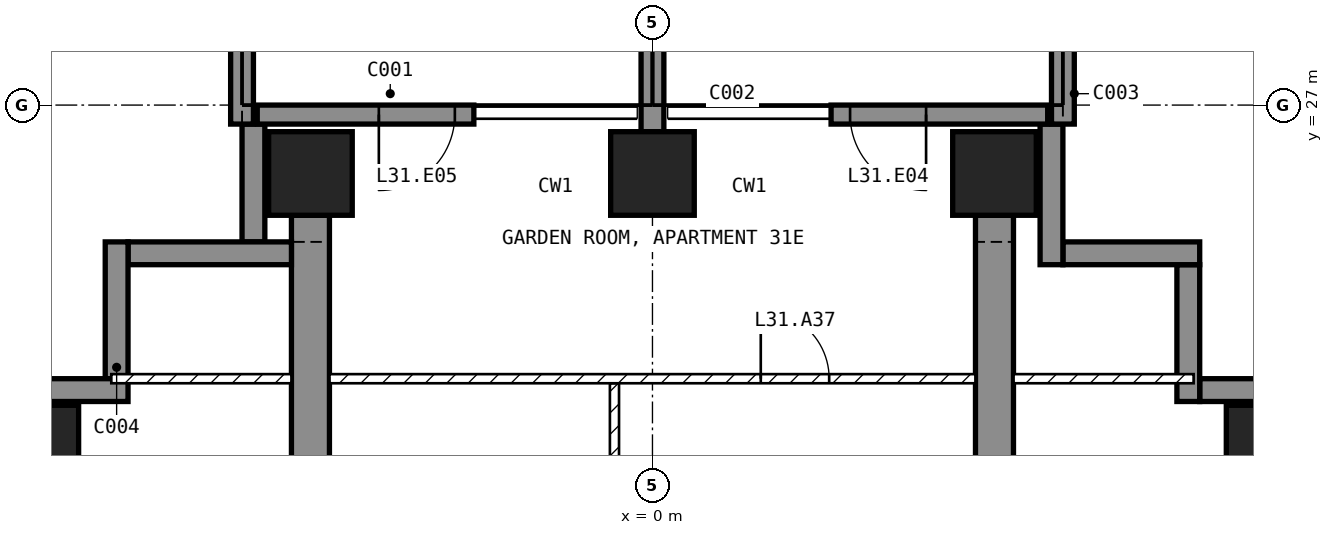
"""IFC4 building model, lengths in metres.
Left out: names, types, materials, properties, quantities, classifications, styles, units other than length and angle.
Written with IfcOpenShell. Run it as: python <this file> out.ifc"""

import sys

from ifc_helpers import new_model, si_unit, direction, frame, frame_2d, origin, origin_2d, place, context, subcontext, project, spatial, polyline, rectangle, outline, extrude, element, fill, save


model = new_model("IFC4")
c1 = context("Model", 3, precision=1e-05, world=origin(), true_north=direction((0.0, 1.0)))
c2 = subcontext(c1, "Body", "Model", "MODEL_VIEW")
j1 = project(units=[si_unit("LENGTHUNIT", "METRE"), si_unit("PLANEANGLEUNIT", "RADIAN")], contexts=[c1])
p1 = place(None, origin())
s1 = spatial("IfcSite", under=j1, at=p1, CompositionType="ELEMENT")
p2 = place(p1, origin())
s2 = spatial("IfcBuilding", under=s1, at=p2, CompositionType="ELEMENT")
p3 = place(p2, frame((0.0, 0.0, 130.4)))
s3 = spatial("IfcBuildingStorey", under=s2, at=p3, CompositionType="ELEMENT", Elevation=130.4)
for number, where, z_axis, x_axis in (
    (1, (-8.1, 22.5, -0.25), (0.0, 0.0, 1.0), (1.0, 0.0, 0.0)),
    (2, (-4.5, 26.1, -0.25), (0.0, 0.0, 1.0), (1.0, 0.0, 0.0)),
    (3, (0.0, 26.1, -0.25), (0.0, 0.0, 1.0), (1.0, 0.0, 0.0)),
    (4, (4.5, 26.1, -0.25), (0.0, 0.0, 1.0), (1.0, 0.0, 0.0)),
    (5, (8.1, 22.5, -0.25), (0.0, 0.0, 1.0), (1.0, 0.0, 0.0)),
):
    element("IfcColumn", number, at=place(p3, frame(where, z_axis=z_axis, x_axis=x_axis)), inside=s3, PredefinedType="COLUMN", context=c2, shape_type="SweptSolid", body=[
        extrude(rectangle(XDim=1.1, YDim=1.1, at=origin_2d()), origin(), (0.0, 0.0, 1.0), 3.5),
    ])
for number, where, z_axis, x_axis in (
    (6, (-4.75, 9.0, -0.25), (1.0, 0.0, 0.0), (0.0, 1.0, 0.0)),
    (7, (4.25, 9.0, -0.25), (1.0, 0.0, 0.0), (0.0, 1.0, 0.0)),
):
    element("IfcWall", number, at=place(p3, frame(where, z_axis=z_axis, x_axis=x_axis)), inside=s3, PredefinedType="SHEAR", context=c2, shape_type="SweptSolid", body=[
        extrude(outline(polyline([(0.0, 0.0), (2.1, 0.0), (2.1, 2.65), (4.5, 2.65), (4.5, 0.0), (9.9, 0.0), (9.9, 2.65), (12.3, 2.65), (12.3, 0.0), (16.55, 0.0), (16.55, 3.5), (0.0, 3.5), (0.0, 0.0)])), origin(), (0.0, 0.0, 1.0), 0.5),
    ])
p4 = place(p3, frame((5.2, 26.875, 0.0), z_axis=(0.0, 0.0, 1.0), x_axis=(-1.0, 0.0, 0.0)))
e8 = element("IfcWall", 8, at=p4, inside=s3, PredefinedType="SOLIDWALL", context=c2, shape_type="SweptSolid", body=[
    extrude(rectangle(XDim=2.85, YDim=0.25, at=frame_2d((1.425, 0.0))), origin(), (0.0, 0.0, 1.0), 3.25),
])
p5 = place(p4, frame((1.6, 0.0, 0.0)))
e9 = element("IfcOpeningElement", 9, at=p5, cuts=e8, PredefinedType="OPENING", context=c2, shape_type="SweptSolid", body=[
    extrude(rectangle(XDim=1.0, YDim=2.4, at=frame_2d((0.5, 1.2))), frame((0.0, 0.135, 0.0), z_axis=(0.0, -1.0, 0.0), x_axis=(1.0, 0.0, 0.0)), (0.0, 0.0, 1.0), 0.27),
])
p6 = place(p3, frame((-2.35, 26.875, 0.0), z_axis=(0.0, 0.0, 1.0), x_axis=(-1.0, 0.0, 0.0)))
e10 = element("IfcWall", 10, at=p6, inside=s3, PredefinedType="SOLIDWALL", context=c2, shape_type="SweptSolid", body=[
    extrude(rectangle(XDim=2.85, YDim=0.25, at=frame_2d((1.425, 0.0))), origin(), (0.0, 0.0, 1.0), 3.25),
])
p7 = place(p6, frame((0.25, 0.0, 0.0)))
e11 = element("IfcOpeningElement", 11, at=p7, cuts=e10, PredefinedType="OPENING", context=c2, shape_type="SweptSolid", body=[
    extrude(rectangle(XDim=1.0, YDim=2.4, at=frame_2d((0.5, 1.2))), frame((0.0, 0.135, 0.0), z_axis=(0.0, -1.0, 0.0), x_axis=(1.0, 0.0, 0.0)), (0.0, 0.0, 1.0), 0.27),
])
p8 = place(p3, frame((8.75, 23.25, 0.0), z_axis=(0.0, 0.0, 1.0), x_axis=(-1.0, 0.0, 0.0)))
e12 = element("IfcWall", 12, at=p8, inside=s3, PredefinedType="SOLIDWALL", context=c2, shape_type="SweptSolid", body=[
    extrude(rectangle(XDim=1.55, YDim=0.3, at=frame_2d((0.775, 0.0))), origin(), (0.0, 0.0, 1.0), 3.25),
])
p9 = place(p3, frame((7.05, 23.1, 0.0), z_axis=(0.0, 0.0, 1.0), x_axis=(0.0, 1.0, 0.0)))
e13 = element("IfcWall", 13, at=p9, inside=s3, PredefinedType="SOLIDWALL", context=c2, shape_type="SweptSolid", body=[
    extrude(rectangle(XDim=1.8, YDim=0.3, at=frame_2d((0.9, 0.0))), origin(), (0.0, 0.0, 1.0), 3.25),
])
p10 = place(p3, frame((7.2, 25.05, 0.0), z_axis=(0.0, 0.0, 1.0), x_axis=(-1.0, 0.0, 0.0)))
e14 = element("IfcWall", 14, at=p10, inside=s3, PredefinedType="SOLIDWALL", context=c2, shape_type="SweptSolid", body=[
    extrude(rectangle(XDim=1.8, YDim=0.3, at=frame_2d((0.9, 0.0))), origin(), (0.0, 0.0, 1.0), 3.25),
])
p11 = place(p3, frame((5.25, 24.9, 0.0), z_axis=(0.0, 0.0, 1.0), x_axis=(0.0, 1.0, 0.0)))
e15 = element("IfcWall", 15, at=p11, inside=s3, PredefinedType="SOLIDWALL", context=c2, shape_type="SweptSolid", body=[
    extrude(rectangle(XDim=1.85, YDim=0.3, at=frame_2d((0.925, 0.0))), origin(), (0.0, 0.0, 1.0), 3.25),
])
p12 = place(p3, frame((-5.25, 26.75, 0.0), z_axis=(0.0, 0.0, 1.0), x_axis=(0.0, -1.0, 0.0)))
e16 = element("IfcWall", 16, at=p12, inside=s3, PredefinedType="SOLIDWALL", context=c2, shape_type="SweptSolid", body=[
    extrude(rectangle(XDim=1.55, YDim=0.3, at=frame_2d((0.775, 0.0))), origin(), (0.0, 0.0, 1.0), 3.25),
])
p13 = place(p3, frame((-4.75, 25.05, 0.0), z_axis=(0.0, 0.0, 1.0), x_axis=(-1.0, 0.0, 0.0)))
e17 = element("IfcWall", 17, at=p13, inside=s3, PredefinedType="SOLIDWALL", context=c2, shape_type="SweptSolid", body=[
    extrude(rectangle(XDim=2.15, YDim=0.3, at=frame_2d((1.075, 0.0))), origin(), (0.0, 0.0, 1.0), 3.25),
])
p14 = place(p3, frame((-7.05, 25.2, 0.0), z_axis=(0.0, 0.0, 1.0), x_axis=(0.0, -1.0, 0.0)))
e18 = element("IfcWall", 18, at=p14, inside=s3, PredefinedType="SOLIDWALL", context=c2, shape_type="SweptSolid", body=[
    extrude(rectangle(XDim=1.8, YDim=0.3, at=frame_2d((0.9, 0.0))), origin(), (0.0, 0.0, 1.0), 3.25),
])
p15 = place(p3, frame((-6.9, 23.25, 0.0), z_axis=(0.0, 0.0, 1.0), x_axis=(-1.0, 0.0, 0.0)))
e19 = element("IfcWall", 19, at=p15, inside=s3, PredefinedType="SOLIDWALL", context=c2, shape_type="SweptSolid", body=[
    extrude(rectangle(XDim=1.85, YDim=0.3, at=frame_2d((0.925, 0.0))), origin(), (0.0, 0.0, 1.0), 3.25),
])
p16 = place(p3, frame((-5.4, 26.75, 0.0), z_axis=(0.0, 0.0, 1.0), x_axis=(0.0, 1.0, 0.0)))
e20 = element("IfcWall", 20, at=p16, inside=s3, PredefinedType="SOLIDWALL", context=c2, shape_type="SweptSolid", body=[
    extrude(rectangle(XDim=2.95, YDim=0.3, at=frame_2d((1.475, 0.0))), origin(), (0.0, 0.0, 1.0), 3.25),
])
p17 = place(p3, frame((0.0, 26.65, 0.0), z_axis=(0.0, 0.0, 1.0), x_axis=(0.0, 1.0, 0.0)))
e21 = element("IfcWall", 21, at=p17, inside=s3, PredefinedType="SOLIDWALL", context=c2, shape_type="SweptSolid", body=[
    extrude(rectangle(XDim=3.05, YDim=0.3, at=frame_2d((1.525, 0.0))), origin(), (0.0, 0.0, 1.0), 3.25),
])
p18 = place(p3, frame((5.4, 26.75, 0.0), z_axis=(0.0, 0.0, 1.0), x_axis=(0.0, 1.0, 0.0)))
e22 = element("IfcWall", 22, at=p18, inside=s3, PredefinedType="SOLIDWALL", context=c2, shape_type="SweptSolid", body=[
    extrude(rectangle(XDim=2.95, YDim=0.3, at=frame_2d((1.475, 0.0))), origin(), (0.0, 0.0, 1.0), 3.25),
])
p19 = place(p3, frame((-0.5, 18.96, 0.0), z_axis=(0.0, 0.0, 1.0), x_axis=(0.0, 1.0, 0.0)))
e23 = element("IfcWall", 23, at=p19, inside=s3, PredefinedType="PARTITIONING", context=c2, shape_type="SweptSolid", body=[
    extrude(rectangle(XDim=4.38, YDim=0.12, at=frame_2d((2.19, 0.0))), origin(), (0.0, 0.0, 1.0), 3.25),
])
p20 = place(p19, frame((1.74, 0.0, 0.0)))
e24 = element("IfcOpeningElement", 24, at=p20, cuts=e23, PredefinedType="OPENING", context=c2, shape_type="SweptSolid", body=[
    extrude(rectangle(XDim=0.9, YDim=2.1, at=frame_2d((0.45, 1.05))), frame((0.0, 0.07, 0.0), z_axis=(0.0, -1.0, 0.0), x_axis=(1.0, 0.0, 0.0)), (0.0, 0.0, 1.0), 0.14),
])
p21 = place(p3, frame((-4.25, 23.4, 0.0), z_axis=(0.0, 0.0, 1.0), x_axis=(1.0, 0.0, 0.0)))
e25 = element("IfcWall", 25, at=p21, inside=s3, PredefinedType="PARTITIONING", context=c2, shape_type="SweptSolid", body=[
    extrude(rectangle(XDim=8.5, YDim=0.12, at=frame_2d((4.25, 0.0))), origin(), (0.0, 0.0, 1.0), 3.25),
])
p22 = place(p21, frame((5.675, 0.0, 0.0)))
e26 = element("IfcOpeningElement", 26, at=p22, cuts=e25, PredefinedType="OPENING", context=c2, shape_type="SweptSolid", body=[
    extrude(rectangle(XDim=0.9, YDim=2.1, at=frame_2d((0.45, 1.05))), frame((0.0, 0.07, 0.0), z_axis=(0.0, -1.0, 0.0), x_axis=(1.0, 0.0, 0.0)), (0.0, 0.0, 1.0), 0.14),
])
for number, where, z_axis, x_axis in (
    (27, (4.75, 23.4, 0.0), (0.0, 0.0, 1.0), (1.0, 0.0, 0.0)),
    (28, (-7.12, 23.4, 0.0), (0.0, 0.0, 1.0), (1.0, 0.0, 0.0)),
):
    element("IfcWall", number, at=place(p3, frame(where, z_axis=z_axis, x_axis=x_axis)), inside=s3, PredefinedType="PARTITIONING", context=c2, shape_type="SweptSolid", body=[
        extrude(rectangle(XDim=2.37, YDim=0.12, at=frame_2d((1.185, 0.0))), origin(), (0.0, 0.0, 1.0), 3.25),
    ])
p23 = place(p5, origin())
e29 = element("IfcDoor", 29, at=p23, inside=s3, OperationType="SINGLE_SWING_LEFT", PredefinedType="DOOR", context=c2, shape_type="SweptSolid", body=[
    extrude(rectangle(XDim=1.0, YDim=2.4, at=frame_2d((0.5, 1.2))), frame((0.0, 0.025, 0.0), z_axis=(0.0, -1.0, 0.0), x_axis=(1.0, 0.0, 0.0)), (0.0, 0.0, 1.0), 0.05),
])
fill(e9, e29)
p24 = place(p7, origin())
e30 = element("IfcDoor", 30, at=p24, inside=s3, OperationType="SINGLE_SWING_RIGHT", PredefinedType="DOOR", context=c2, shape_type="SweptSolid", body=[
    extrude(rectangle(XDim=1.0, YDim=2.4, at=frame_2d((0.5, 1.2))), frame((0.0, 0.025, 0.0), z_axis=(0.0, -1.0, 0.0), x_axis=(1.0, 0.0, 0.0)), (0.0, 0.0, 1.0), 0.05),
])
fill(e11, e30)
p25 = place(p22, origin())
e31 = element("IfcDoor", 31, at=p25, inside=s3, OperationType="SINGLE_SWING_LEFT", PredefinedType="DOOR", context=c2, shape_type="SweptSolid", body=[
    extrude(rectangle(XDim=0.9, YDim=2.1, at=frame_2d((0.45, 1.05))), frame((0.0, 0.025, 0.0), z_axis=(0.0, -1.0, 0.0), x_axis=(1.0, 0.0, 0.0)), (0.0, 0.0, 1.0), 0.05),
])
fill(e26, e31)
save(model, sys.argv[1])
